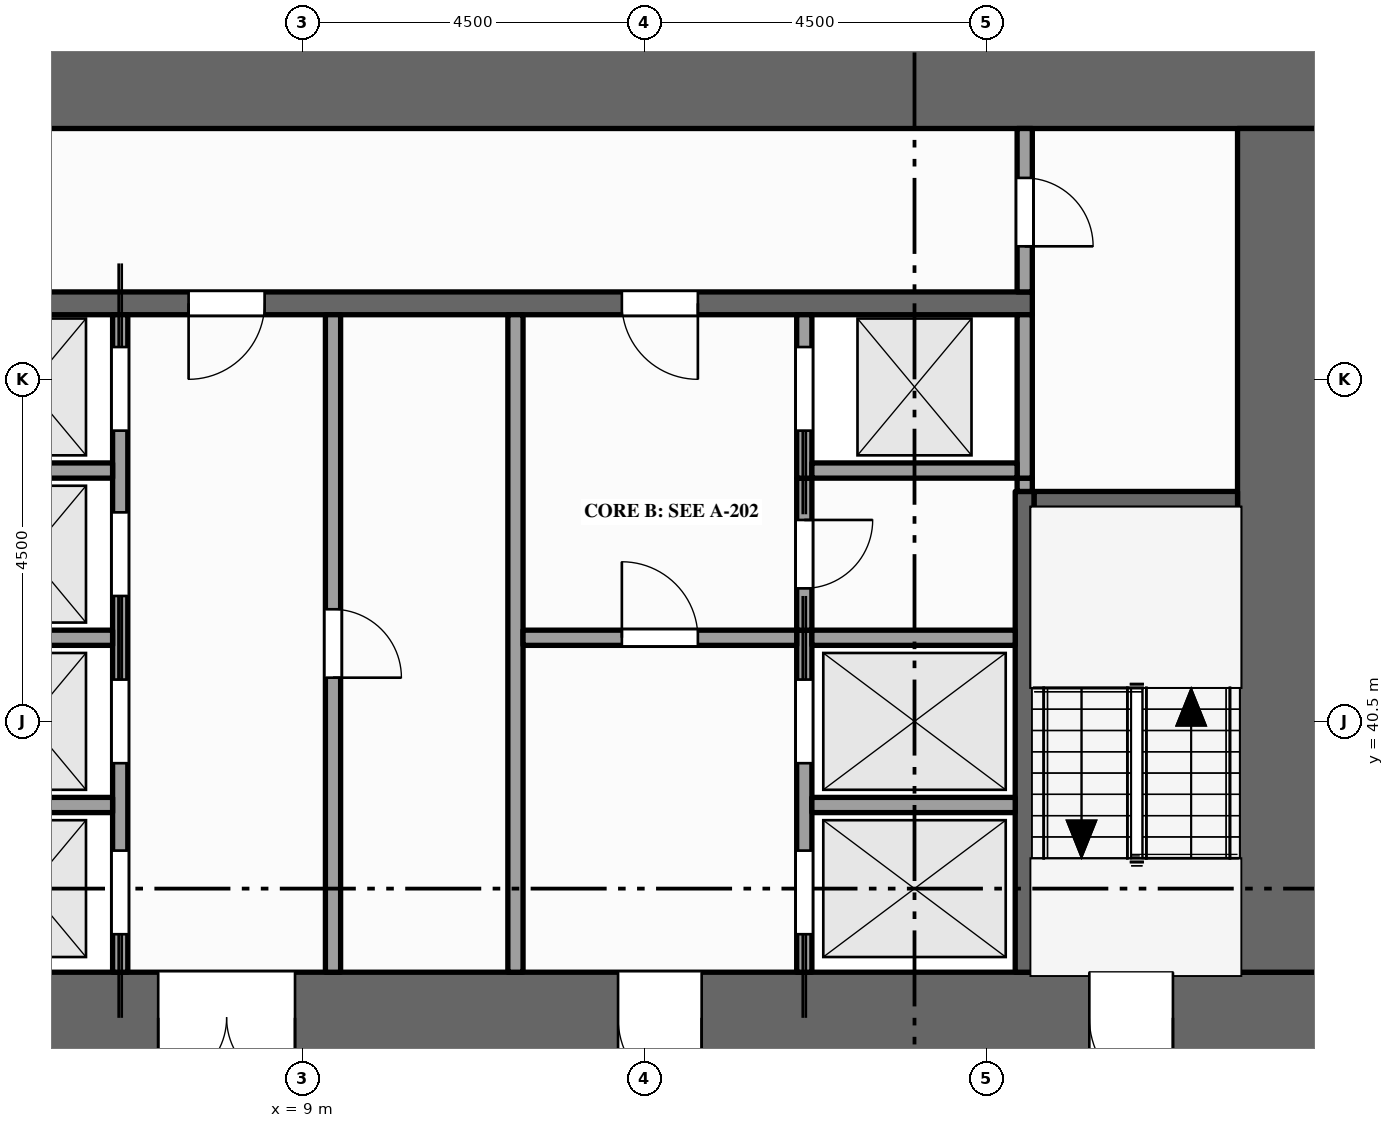
"""IFC4 building model, lengths in metres.
Left out: names, types, materials, properties, quantities, classifications, styles, units other than length and angle.
Written with IfcOpenShell. Run it as: python <this file> out.ifc"""

import sys

from ifc_helpers import new_model, si_unit, direction, frame, frame_2d, origin, place, context, subcontext, project, spatial, rectangle, extrude, element, fill, save


model = new_model("IFC4")
c1 = context("Model", 3, precision=1e-05, world=origin(), true_north=direction((0.0, 1.0)))
c2 = subcontext(c1, "Body", "Model", "MODEL_VIEW")
j1 = project(units=[si_unit("LENGTHUNIT", "METRE"), si_unit("PLANEANGLEUNIT", "RADIAN")], contexts=[c1])
p1 = place(None, origin())
s1 = spatial("IfcSite", under=j1, at=p1, CompositionType="ELEMENT")
p2 = place(p1, origin())
s2 = spatial("IfcBuilding", under=s1, at=p2, CompositionType="ELEMENT")
p3 = place(p2, frame((0.0, 0.0, 8.0)))
s3 = spatial("IfcBuildingStorey", under=s2, at=p3, CompositionType="ELEMENT", Elevation=8.0)
p4 = place(p3, frame((0.0, 36.6, -0.15), z_axis=(0.0, 0.0, 1.0), x_axis=(1.0, 0.0, 0.0)))
e1 = element("IfcWall", 1, at=p4, inside=s3, PredefinedType="SHEAR", context=c2, shape_type="SweptSolid", body=[
    extrude(rectangle(XDim=22.5, YDim=1.2, at=frame_2d((11.25, 0.0))), origin(), (0.0, 0.0, 1.0), 6.0),
])
p5 = place(p4, frame((7.1, 0.0, 0.15)))
e2 = element("IfcOpeningElement", 2, at=p5, cuts=e1, PredefinedType="OPENING", context=c2, shape_type="SweptSolid", body=[
    extrude(rectangle(XDim=1.8, YDim=2.1, at=frame_2d((0.9, 1.05))), frame((0.0, 0.61, 0.0), z_axis=(0.0, -1.0, 0.0), x_axis=(1.0, 0.0, 0.0)), (0.0, 0.0, 1.0), 1.22),
])
p6 = place(p4, frame((13.15, 0.0, 0.15)))
e3 = element("IfcOpeningElement", 3, at=p6, cuts=e1, PredefinedType="OPENING", context=c2, shape_type="SweptSolid", body=[
    extrude(rectangle(XDim=1.1, YDim=2.1, at=frame_2d((0.55, 1.05))), frame((0.0, 0.61, 0.0), z_axis=(0.0, -1.0, 0.0), x_axis=(1.0, 0.0, 0.0)), (0.0, 0.0, 1.0), 1.22),
])
p7 = place(p4, frame((2.15, 0.0, 0.15)))
e4 = element("IfcOpeningElement", 4, at=p7, cuts=e1, PredefinedType="OPENING", context=c2, shape_type="SweptSolid", body=[
    extrude(rectangle(XDim=1.1, YDim=2.1, at=frame_2d((0.55, 1.05))), frame((0.0, 0.61, 0.0), z_axis=(0.0, -1.0, 0.0), x_axis=(1.0, 0.0, 0.0)), (0.0, 0.0, 1.0), 1.22),
])
p8 = place(p4, frame((19.35, 0.0, 0.15)))
e5 = element("IfcOpeningElement", 5, at=p8, cuts=e1, PredefinedType="OPENING", context=c2, shape_type="SweptSolid", body=[
    extrude(rectangle(XDim=1.1, YDim=2.1, at=frame_2d((0.55, 1.05))), frame((0.0, 0.61, 0.0), z_axis=(0.0, -1.0, 0.0), x_axis=(1.0, 0.0, 0.0)), (0.0, 0.0, 1.0), 1.22),
])
p9 = place(p3, frame((0.0, 48.9, -0.15), z_axis=(0.0, 0.0, 1.0), x_axis=(1.0, 0.0, 0.0)))
e6 = element("IfcWall", 6, at=p9, inside=s3, PredefinedType="SHEAR", context=c2, shape_type="SweptSolid", body=[
    extrude(rectangle(XDim=22.5, YDim=1.2, at=frame_2d((11.25, 0.0))), origin(), (0.0, 0.0, 1.0), 6.0),
])
p10 = place(p3, frame((21.9, 37.2, -0.15), z_axis=(0.0, 0.0, 1.0), x_axis=(0.0, 1.0, 0.0)))
e7 = element("IfcWall", 7, at=p10, inside=s3, PredefinedType="SHEAR", context=c2, shape_type="SweptSolid", body=[
    extrude(rectangle(XDim=11.1, YDim=1.2, at=frame_2d((5.55, 0.0))), origin(), (0.0, 0.0, 1.0), 6.0),
])
p11 = place(p3, frame((6.6, 37.2, 0.0), z_axis=(0.0, 0.0, 1.0), x_axis=(0.0, 1.0, 0.0)))
e8 = element("IfcWall", 8, at=p11, inside=s3, PredefinedType="SOLIDWALL", context=c2, shape_type="SweptSolid", body=[
    extrude(rectangle(XDim=8.65, YDim=0.2, at=frame_2d((4.325, 0.0))), origin(), (0.0, 0.0, 1.0), 5.75),
])
p12 = place(p11, frame((0.5, 0.0, 0.012)))
e9 = element("IfcOpeningElement", 9, at=p12, cuts=e8, PredefinedType="OPENING", context=c2, shape_type="SweptSolid", body=[
    extrude(rectangle(XDim=1.1, YDim=2.1, at=frame_2d((0.55, 1.05))), frame((0.0, 0.11, 0.0), z_axis=(0.0, -1.0, 0.0), x_axis=(1.0, 0.0, 0.0)), (0.0, 0.0, 1.0), 0.22),
])
p13 = place(p11, frame((2.75, 0.0, 0.012)))
e10 = element("IfcOpeningElement", 10, at=p13, cuts=e8, PredefinedType="OPENING", context=c2, shape_type="SweptSolid", body=[
    extrude(rectangle(XDim=1.1, YDim=2.1, at=frame_2d((0.55, 1.05))), frame((0.0, 0.11, 0.0), z_axis=(0.0, -1.0, 0.0), x_axis=(1.0, 0.0, 0.0)), (0.0, 0.0, 1.0), 0.22),
])
p14 = place(p11, frame((4.95, 0.0, 0.012)))
e11 = element("IfcOpeningElement", 11, at=p14, cuts=e8, PredefinedType="OPENING", context=c2, shape_type="SweptSolid", body=[
    extrude(rectangle(XDim=1.1, YDim=2.1, at=frame_2d((0.55, 1.05))), frame((0.0, 0.11, 0.0), z_axis=(0.0, -1.0, 0.0), x_axis=(1.0, 0.0, 0.0)), (0.0, 0.0, 1.0), 0.22),
])
p15 = place(p11, frame((7.125, 0.0, 0.012)))
e12 = element("IfcOpeningElement", 12, at=p15, cuts=e8, PredefinedType="OPENING", context=c2, shape_type="SweptSolid", body=[
    extrude(rectangle(XDim=1.1, YDim=2.1, at=frame_2d((0.55, 1.05))), frame((0.0, 0.11, 0.0), z_axis=(0.0, -1.0, 0.0), x_axis=(1.0, 0.0, 0.0)), (0.0, 0.0, 1.0), 0.22),
])
p16 = place(p3, frame((9.4, 37.2, 0.0), z_axis=(0.0, 0.0, 1.0), x_axis=(0.0, 1.0, 0.0)))
e13 = element("IfcWall", 13, at=p16, inside=s3, PredefinedType="PARTITIONING", context=c2, shape_type="SweptSolid", body=[
    extrude(rectangle(XDim=8.65, YDim=0.2, at=frame_2d((4.325, 0.0))), origin(), (0.0, 0.0, 1.0), 5.75),
])
p17 = place(p16, frame((3.875, 0.0, 0.0)))
e14 = element("IfcOpeningElement", 14, at=p17, cuts=e13, PredefinedType="OPENING", context=c2, shape_type="SweptSolid", body=[
    extrude(rectangle(XDim=0.9, YDim=2.1, at=frame_2d((0.45, 1.05))), frame((0.0, 0.11, 0.0), z_axis=(0.0, -1.0, 0.0), x_axis=(1.0, 0.0, 0.0)), (0.0, 0.0, 1.0), 0.22),
])
p18 = place(p3, frame((11.8, 37.2, 0.0), z_axis=(0.0, 0.0, 1.0), x_axis=(0.0, 1.0, 0.0)))
e15 = element("IfcWall", 15, at=p18, inside=s3, PredefinedType="PARTITIONING", context=c2, shape_type="SweptSolid", body=[
    extrude(rectangle(XDim=8.65, YDim=0.2, at=frame_2d((4.325, 0.0))), origin(), (0.0, 0.0, 1.0), 5.75),
])
p19 = place(p3, frame((15.6, 37.2, 0.0), z_axis=(0.0, 0.0, 1.0), x_axis=(0.0, 1.0, 0.0)))
e16 = element("IfcWall", 16, at=p19, inside=s3, PredefinedType="SOLIDWALL", context=c2, shape_type="SweptSolid", body=[
    extrude(rectangle(XDim=4.5, YDim=0.2, at=frame_2d((2.25, 0.0))), origin(), (0.0, 0.0, 1.0), 5.75),
])
p20 = place(p19, frame((0.5, 0.0, 0.012)))
e17 = element("IfcOpeningElement", 17, at=p20, cuts=e16, PredefinedType="OPENING", context=c2, shape_type="SweptSolid", body=[
    extrude(rectangle(XDim=1.1, YDim=2.1, at=frame_2d((0.55, 1.05))), frame((0.0, 0.11, 0.0), z_axis=(0.0, -1.0, 0.0), x_axis=(1.0, 0.0, 0.0)), (0.0, 0.0, 1.0), 0.22),
])
p21 = place(p19, frame((2.75, 0.0, 0.012)))
e18 = element("IfcOpeningElement", 18, at=p21, cuts=e16, PredefinedType="OPENING", context=c2, shape_type="SweptSolid", body=[
    extrude(rectangle(XDim=1.1, YDim=2.1, at=frame_2d((0.55, 1.05))), frame((0.0, 0.11, 0.0), z_axis=(0.0, -1.0, 0.0), x_axis=(1.0, 0.0, 0.0)), (0.0, 0.0, 1.0), 0.22),
])
p22 = place(p3, frame((15.6, 41.7, 0.0), z_axis=(0.0, 0.0, 1.0), x_axis=(0.0, 1.0, 0.0)))
e19 = element("IfcWall", 19, at=p22, inside=s3, PredefinedType="PARTITIONING", context=c2, shape_type="SweptSolid", body=[
    extrude(rectangle(XDim=2.0, YDim=0.2, at=frame_2d((1.0, 0.0))), origin(), (0.0, 0.0, 1.0), 5.75),
])
p23 = place(p22, frame((0.55, 0.0, 0.0)))
e20 = element("IfcOpeningElement", 20, at=p23, cuts=e19, PredefinedType="OPENING", context=c2, shape_type="SweptSolid", body=[
    extrude(rectangle(XDim=0.9, YDim=2.1, at=frame_2d((0.45, 1.05))), frame((0.0, 0.11, 0.0), z_axis=(0.0, -1.0, 0.0), x_axis=(1.0, 0.0, 0.0)), (0.0, 0.0, 1.0), 0.22),
])
p24 = place(p3, frame((15.6, 43.7, 0.0), z_axis=(0.0, 0.0, 1.0), x_axis=(0.0, 1.0, 0.0)))
e21 = element("IfcWall", 21, at=p24, inside=s3, PredefinedType="SOLIDWALL", context=c2, shape_type="SweptSolid", body=[
    extrude(rectangle(XDim=2.15, YDim=0.2, at=frame_2d((1.075, 0.0))), origin(), (0.0, 0.0, 1.0), 5.75),
])
p25 = place(p24, frame((0.625, 0.0, 0.012)))
e22 = element("IfcOpeningElement", 22, at=p25, cuts=e21, PredefinedType="OPENING", context=c2, shape_type="SweptSolid", body=[
    extrude(rectangle(XDim=1.1, YDim=2.1, at=frame_2d((0.55, 1.05))), frame((0.0, 0.11, 0.0), z_axis=(0.0, -1.0, 0.0), x_axis=(1.0, 0.0, 0.0)), (0.0, 0.0, 1.0), 0.22),
])
p26 = place(p3, frame((18.5, 37.2, 0.0), z_axis=(0.0, 0.0, 1.0), x_axis=(0.0, 1.0, 0.0)))
e23 = element("IfcWall", 23, at=p26, inside=s3, PredefinedType="SHEAR", context=c2, shape_type="SweptSolid", body=[
    extrude(rectangle(XDim=6.325, YDim=0.25, at=frame_2d((3.163, 0.0))), origin(), (0.0, 0.0, 1.0), 5.75),
])
p27 = place(p3, frame((18.5, 43.525, 0.0), z_axis=(0.0, 0.0, 1.0), x_axis=(0.0, 1.0, 0.0)))
e24 = element("IfcWall", 24, at=p27, inside=s3, PredefinedType="PARTITIONING", context=c2, shape_type="SweptSolid", body=[
    extrude(rectangle(XDim=0.175, YDim=0.2, at=frame_2d((0.087, 0.0))), origin(), (0.0, 0.0, 1.0), 5.75),
])
p28 = place(p3, frame((18.5, 43.7, 0.0), z_axis=(0.0, 0.0, 1.0), x_axis=(0.0, 1.0, 0.0)))
e25 = element("IfcWall", 25, at=p28, inside=s3, PredefinedType="SOLIDWALL", context=c2, shape_type="SweptSolid", body=[
    extrude(rectangle(XDim=2.15, YDim=0.2, at=frame_2d((1.075, 0.0))), origin(), (0.0, 0.0, 1.0), 5.75),
])
p29 = place(p3, frame((18.5, 46.15, 0.0), z_axis=(0.0, 0.0, 1.0), x_axis=(0.0, 1.0, 0.0)))
e26 = element("IfcWall", 26, at=p29, inside=s3, PredefinedType="PARTITIONING", context=c2, shape_type="SweptSolid", body=[
    extrude(rectangle(XDim=2.15, YDim=0.2, at=frame_2d((1.075, 0.0))), origin(), (0.0, 0.0, 1.0), 5.75),
])
p30 = place(p29, frame((0.6, 0.0, 0.0)))
e27 = element("IfcOpeningElement", 27, at=p30, cuts=e26, PredefinedType="OPENING", context=c2, shape_type="SweptSolid", body=[
    extrude(rectangle(XDim=0.9, YDim=2.1, at=frame_2d((0.45, 1.05))), frame((0.0, 0.11, 0.0), z_axis=(0.0, -1.0, 0.0), x_axis=(1.0, 0.0, 0.0)), (0.0, 0.0, 1.0), 0.22),
])
p31 = place(p3, frame((4.325, 39.4, 0.0), z_axis=(0.0, 0.0, 1.0), x_axis=(1.0, 0.0, 0.0)))
e28 = element("IfcWall", 28, at=p31, inside=s3, PredefinedType="SOLIDWALL", context=c2, shape_type="SweptSolid", body=[
    extrude(rectangle(XDim=2.175, YDim=0.2, at=frame_2d((1.087, 0.0))), origin(), (0.0, 0.0, 1.0), 5.75),
])
p32 = place(p3, frame((15.7, 39.4, 0.0), z_axis=(0.0, 0.0, 1.0), x_axis=(1.0, 0.0, 0.0)))
e29 = element("IfcWall", 29, at=p32, inside=s3, PredefinedType="SOLIDWALL", context=c2, shape_type="SweptSolid", body=[
    extrude(rectangle(XDim=2.675, YDim=0.2, at=frame_2d((1.337, 0.0))), origin(), (0.0, 0.0, 1.0), 5.75),
])
p33 = place(p3, frame((4.325, 41.6, 0.0), z_axis=(0.0, 0.0, 1.0), x_axis=(1.0, 0.0, 0.0)))
e30 = element("IfcWall", 30, at=p33, inside=s3, PredefinedType="SOLIDWALL", context=c2, shape_type="SweptSolid", body=[
    extrude(rectangle(XDim=2.175, YDim=0.2, at=frame_2d((1.087, 0.0))), origin(), (0.0, 0.0, 1.0), 5.75),
])
p34 = place(p3, frame((11.9, 41.6, 0.0), z_axis=(0.0, 0.0, 1.0), x_axis=(1.0, 0.0, 0.0)))
e31 = element("IfcWall", 31, at=p34, inside=s3, PredefinedType="PARTITIONING", context=c2, shape_type="SweptSolid", body=[
    extrude(rectangle(XDim=3.6, YDim=0.2, at=frame_2d((1.8, 0.0))), origin(), (0.0, 0.0, 1.0), 5.75),
])
p35 = place(p34, frame((1.3, 0.0, 0.0)))
e32 = element("IfcOpeningElement", 32, at=p35, cuts=e31, PredefinedType="OPENING", context=c2, shape_type="SweptSolid", body=[
    extrude(rectangle(XDim=1.0, YDim=2.1, at=frame_2d((0.5, 1.05))), frame((0.0, 0.11, 0.0), z_axis=(0.0, -1.0, 0.0), x_axis=(1.0, 0.0, 0.0)), (0.0, 0.0, 1.0), 0.22),
])
p36 = place(p3, frame((15.7, 41.6, 0.0), z_axis=(0.0, 0.0, 1.0), x_axis=(1.0, 0.0, 0.0)))
e33 = element("IfcWall", 33, at=p36, inside=s3, PredefinedType="SOLIDWALL", context=c2, shape_type="SweptSolid", body=[
    extrude(rectangle(XDim=2.675, YDim=0.2, at=frame_2d((1.337, 0.0))), origin(), (0.0, 0.0, 1.0), 5.75),
])
p37 = place(p3, frame((18.625, 43.4, 0.0), z_axis=(0.0, 0.0, 1.0), x_axis=(1.0, 0.0, 0.0)))
e34 = element("IfcWall", 34, at=p37, inside=s3, PredefinedType="SHEAR", context=c2, shape_type="SweptSolid", body=[
    extrude(rectangle(XDim=2.675, YDim=0.25, at=frame_2d((1.337, 0.0))), origin(), (0.0, 0.0, 1.0), 5.75),
])
p38 = place(p3, frame((4.3, 43.8, 0.0), z_axis=(0.0, 0.0, 1.0), x_axis=(1.0, 0.0, 0.0)))
e35 = element("IfcWall", 35, at=p38, inside=s3, PredefinedType="SOLIDWALL", context=c2, shape_type="SweptSolid", body=[
    extrude(rectangle(XDim=2.2, YDim=0.2, at=frame_2d((1.1, 0.0))), origin(), (0.0, 0.0, 1.0), 5.75),
])
p39 = place(p3, frame((15.7, 43.8, 0.0), z_axis=(0.0, 0.0, 1.0), x_axis=(1.0, 0.0, 0.0)))
e36 = element("IfcWall", 36, at=p39, inside=s3, PredefinedType="SOLIDWALL", context=c2, shape_type="SweptSolid", body=[
    extrude(rectangle(XDim=2.7, YDim=0.2, at=frame_2d((1.35, 0.0))), origin(), (0.0, 0.0, 1.0), 5.75),
])
p40 = place(p3, frame((4.1, 46.0, 0.0), z_axis=(0.0, 0.0, 1.0), x_axis=(1.0, 0.0, 0.0)))
e37 = element("IfcWall", 37, at=p40, inside=s3, PredefinedType="SHEAR", context=c2, shape_type="SweptSolid", body=[
    extrude(rectangle(XDim=14.5, YDim=0.3, at=frame_2d((7.25, 0.0))), origin(), (0.0, 0.0, 1.0), 5.75),
])
p41 = place(p40, frame((3.4, 0.0, 0.0)))
e38 = element("IfcOpeningElement", 38, at=p41, cuts=e37, PredefinedType="OPENING", context=c2, shape_type="SweptSolid", body=[
    extrude(rectangle(XDim=1.0, YDim=2.1, at=frame_2d((0.5, 1.05))), frame((0.0, 0.16, 0.0), z_axis=(0.0, -1.0, 0.0), x_axis=(1.0, 0.0, 0.0)), (0.0, 0.0, 1.0), 0.32),
])
p42 = place(p40, frame((9.1, 0.0, 0.0)))
e39 = element("IfcOpeningElement", 39, at=p42, cuts=e37, PredefinedType="OPENING", context=c2, shape_type="SweptSolid", body=[
    extrude(rectangle(XDim=1.0, YDim=2.1, at=frame_2d((0.5, 1.05))), frame((0.0, 0.16, 0.0), z_axis=(0.0, -1.0, 0.0), x_axis=(1.0, 0.0, 0.0)), (0.0, 0.0, 1.0), 0.32),
])
p43 = place(p12, origin())
e40 = element("IfcDoor", 40, at=p43, inside=s3, OperationType="SLIDING_TO_LEFT", PredefinedType="DOOR", context=c2, shape_type="SweptSolid", body=[
    extrude(rectangle(XDim=1.1, YDim=2.1, at=frame_2d((0.55, 1.05))), frame((0.0, 0.025, 0.0), z_axis=(0.0, -1.0, 0.0), x_axis=(1.0, 0.0, 0.0)), (0.0, 0.0, 1.0), 0.05),
])
fill(e9, e40)
p44 = place(p13, origin())
e41 = element("IfcDoor", 41, at=p44, inside=s3, OperationType="SLIDING_TO_RIGHT", PredefinedType="DOOR", context=c2, shape_type="SweptSolid", body=[
    extrude(rectangle(XDim=1.1, YDim=2.1, at=frame_2d((0.55, 1.05))), frame((0.0, 0.025, 0.0), z_axis=(0.0, -1.0, 0.0), x_axis=(1.0, 0.0, 0.0)), (0.0, 0.0, 1.0), 0.05),
])
fill(e10, e41)
p45 = place(p14, origin())
e42 = element("IfcDoor", 42, at=p45, inside=s3, OperationType="SLIDING_TO_LEFT", PredefinedType="DOOR", context=c2, shape_type="SweptSolid", body=[
    extrude(rectangle(XDim=1.1, YDim=2.1, at=frame_2d((0.55, 1.05))), frame((0.0, 0.025, 0.0), z_axis=(0.0, -1.0, 0.0), x_axis=(1.0, 0.0, 0.0)), (0.0, 0.0, 1.0), 0.05),
])
fill(e11, e42)
p46 = place(p15, origin())
e43 = element("IfcDoor", 43, at=p46, inside=s3, OperationType="SLIDING_TO_RIGHT", PredefinedType="DOOR", context=c2, shape_type="SweptSolid", body=[
    extrude(rectangle(XDim=1.1, YDim=2.1, at=frame_2d((0.55, 1.05))), frame((0.0, 0.025, 0.0), z_axis=(0.0, -1.0, 0.0), x_axis=(1.0, 0.0, 0.0)), (0.0, 0.0, 1.0), 0.05),
])
fill(e12, e43)
p47 = place(p20, origin())
e44 = element("IfcDoor", 44, at=p47, inside=s3, OperationType="SLIDING_TO_LEFT", PredefinedType="DOOR", context=c2, shape_type="SweptSolid", body=[
    extrude(rectangle(XDim=1.1, YDim=2.1, at=frame_2d((0.55, 1.05))), frame((0.0, 0.025, 0.0), z_axis=(0.0, -1.0, 0.0), x_axis=(1.0, 0.0, 0.0)), (0.0, 0.0, 1.0), 0.05),
])
fill(e17, e44)
p48 = place(p21, origin())
e45 = element("IfcDoor", 45, at=p48, inside=s3, OperationType="SLIDING_TO_RIGHT", PredefinedType="DOOR", context=c2, shape_type="SweptSolid", body=[
    extrude(rectangle(XDim=1.1, YDim=2.1, at=frame_2d((0.55, 1.05))), frame((0.0, 0.025, 0.0), z_axis=(0.0, -1.0, 0.0), x_axis=(1.0, 0.0, 0.0)), (0.0, 0.0, 1.0), 0.05),
])
fill(e18, e45)
p49 = place(p25, origin())
e46 = element("IfcDoor", 46, at=p49, inside=s3, OperationType="SLIDING_TO_LEFT", PredefinedType="DOOR", context=c2, shape_type="SweptSolid", body=[
    extrude(rectangle(XDim=1.1, YDim=2.1, at=frame_2d((0.55, 1.05))), frame((0.0, 0.025, 0.0), z_axis=(0.0, -1.0, 0.0), x_axis=(1.0, 0.0, 0.0)), (0.0, 0.0, 1.0), 0.05),
])
fill(e22, e46)
p50 = place(p5, origin())
e47 = element("IfcDoor", 47, at=p50, inside=s3, OperationType="DOUBLE_DOOR_SINGLE_SWING", PredefinedType="DOOR", context=c2, shape_type="SweptSolid", body=[
    extrude(rectangle(XDim=1.8, YDim=2.1, at=frame_2d((0.9, 1.05))), frame((0.0, 0.025, 0.0), z_axis=(0.0, -1.0, 0.0), x_axis=(1.0, 0.0, 0.0)), (0.0, 0.0, 1.0), 0.05),
])
fill(e2, e47)
p51 = place(p41, origin())
e48 = element("IfcDoor", 48, at=p51, inside=s3, OperationType="SINGLE_SWING_LEFT", PredefinedType="DOOR", context=c2, shape_type="SweptSolid", body=[
    extrude(rectangle(XDim=1.0, YDim=2.1, at=frame_2d((0.5, 1.05))), frame((0.0, 0.025, 0.0), z_axis=(0.0, -1.0, 0.0), x_axis=(1.0, 0.0, 0.0)), (0.0, 0.0, 1.0), 0.05),
])
fill(e38, e48)
p52 = place(p6, origin())
e49 = element("IfcDoor", 49, at=p52, inside=s3, OperationType="SINGLE_SWING_RIGHT", PredefinedType="DOOR", context=c2, shape_type="SweptSolid", body=[
    extrude(rectangle(XDim=1.1, YDim=2.1, at=frame_2d((0.55, 1.05))), frame((0.0, 0.025, 0.0), z_axis=(0.0, -1.0, 0.0), x_axis=(1.0, 0.0, 0.0)), (0.0, 0.0, 1.0), 0.05),
])
fill(e3, e49)
p53 = place(p35, origin())
e50 = element("IfcDoor", 50, at=p53, inside=s3, OperationType="SINGLE_SWING_LEFT", PredefinedType="DOOR", context=c2, shape_type="SweptSolid", body=[
    extrude(rectangle(XDim=1.0, YDim=2.1, at=frame_2d((0.5, 1.05))), frame((0.0, 0.025, 0.0), z_axis=(0.0, -1.0, 0.0), x_axis=(1.0, 0.0, 0.0)), (0.0, 0.0, 1.0), 0.05),
])
fill(e32, e50)
p54 = place(p42, origin())
e51 = element("IfcDoor", 51, at=p54, inside=s3, OperationType="SINGLE_SWING_RIGHT", PredefinedType="DOOR", context=c2, shape_type="SweptSolid", body=[
    extrude(rectangle(XDim=1.0, YDim=2.1, at=frame_2d((0.5, 1.05))), frame((0.0, 0.025, 0.0), z_axis=(0.0, -1.0, 0.0), x_axis=(1.0, 0.0, 0.0)), (0.0, 0.0, 1.0), 0.05),
])
fill(e39, e51)
p55 = place(p8, origin())
e52 = element("IfcDoor", 52, at=p55, inside=s3, OperationType="SINGLE_SWING_RIGHT", PredefinedType="DOOR", context=c2, shape_type="SweptSolid", body=[
    extrude(rectangle(XDim=1.1, YDim=2.1, at=frame_2d((0.55, 1.05))), frame((0.0, 0.025, 0.0), z_axis=(0.0, -1.0, 0.0), x_axis=(1.0, 0.0, 0.0)), (0.0, 0.0, 1.0), 0.05),
])
fill(e5, e52)
p56 = place(p30, origin())
e53 = element("IfcDoor", 53, at=p56, inside=s3, OperationType="SINGLE_SWING_LEFT", PredefinedType="DOOR", context=c2, shape_type="SweptSolid", body=[
    extrude(rectangle(XDim=0.9, YDim=2.1, at=frame_2d((0.45, 1.05))), frame((0.0, 0.025, 0.0), z_axis=(0.0, -1.0, 0.0), x_axis=(1.0, 0.0, 0.0)), (0.0, 0.0, 1.0), 0.05),
])
fill(e27, e53)
p57 = place(p17, origin())
e54 = element("IfcDoor", 54, at=p57, inside=s3, OperationType="SINGLE_SWING_LEFT", PredefinedType="DOOR", context=c2, shape_type="SweptSolid", body=[
    extrude(rectangle(XDim=0.9, YDim=2.1, at=frame_2d((0.45, 1.05))), frame((0.0, 0.025, 0.0), z_axis=(0.0, -1.0, 0.0), x_axis=(1.0, 0.0, 0.0)), (0.0, 0.0, 1.0), 0.05),
])
fill(e14, e54)
p58 = place(p23, origin())
e55 = element("IfcDoor", 55, at=p58, inside=s3, OperationType="SINGLE_SWING_RIGHT", PredefinedType="DOOR", context=c2, shape_type="SweptSolid", body=[
    extrude(rectangle(XDim=0.9, YDim=2.1, at=frame_2d((0.45, 1.05))), frame((0.0, 0.025, 0.0), z_axis=(0.0, -1.0, 0.0), x_axis=(1.0, 0.0, 0.0)), (0.0, 0.0, 1.0), 0.05),
])
fill(e20, e55)
save(model, sys.argv[1])
